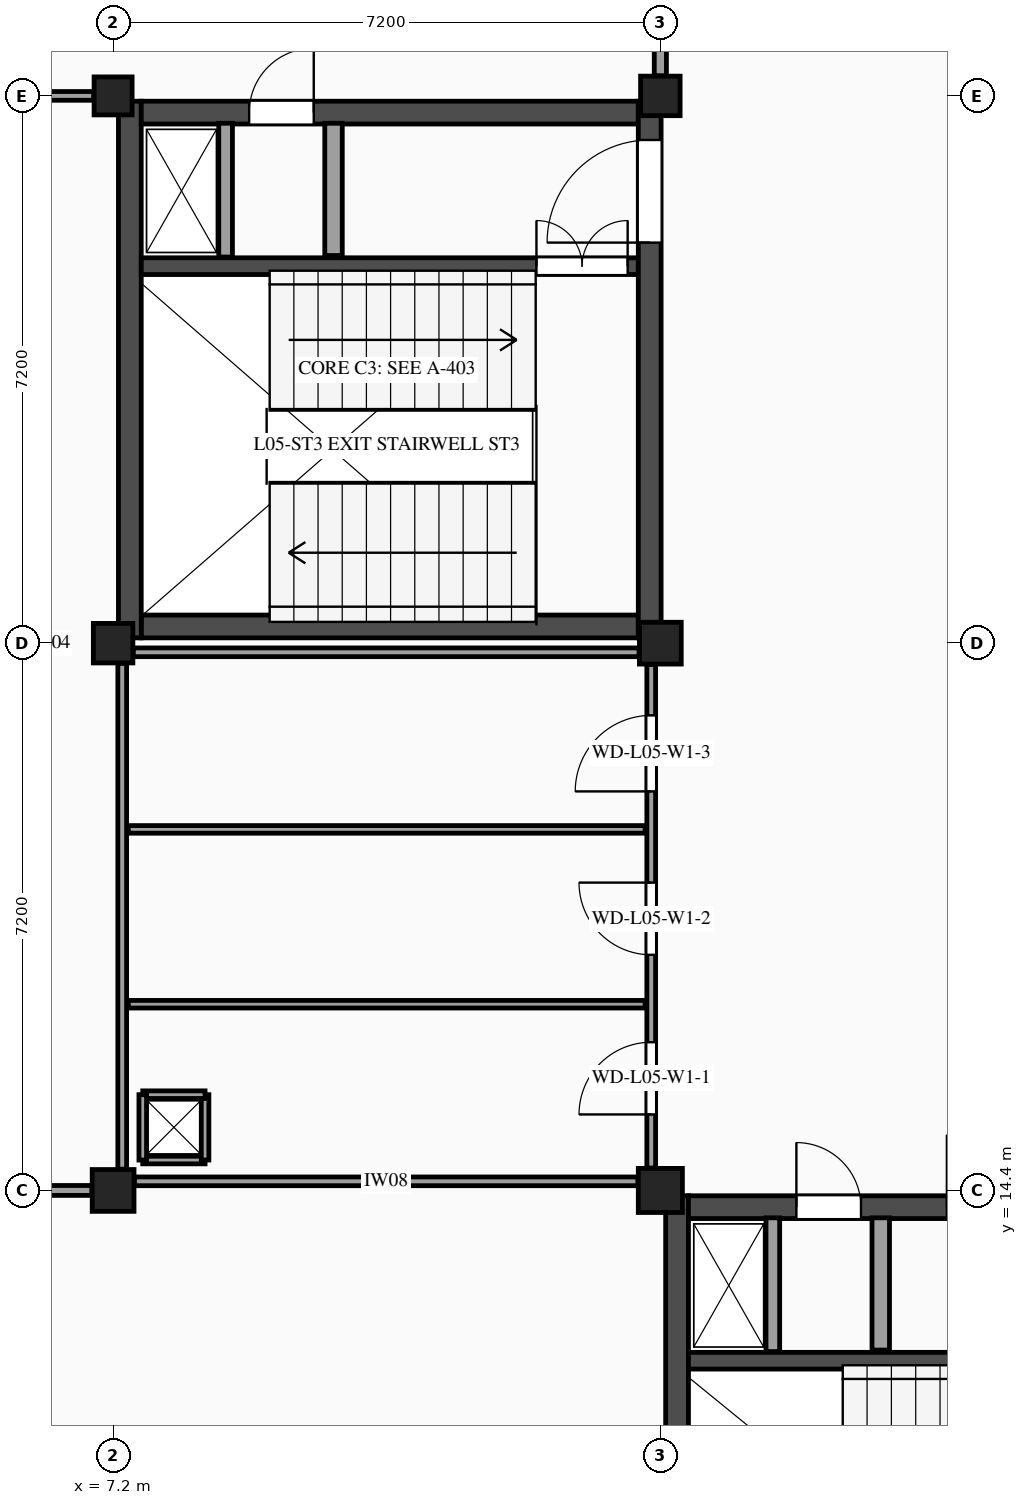
"""IFC4 building model, lengths in metres.
Left out: names, types, materials, properties, quantities, classifications, styles, units other than length and angle.
Written with IfcOpenShell. Run it as: python <this file> out.ifc"""

import sys

from ifc_helpers import new_model, si_unit, direction, frame, frame_2d, origin, origin_2d, place, context, subcontext, project, spatial, rectangle, extrude, element, fill, save


model = new_model("IFC4")
c1 = context("Model", 3, precision=1e-05, world=origin(), true_north=direction((0.0, 1.0)))
c2 = subcontext(c1, "Body", "Model", "MODEL_VIEW")
j1 = project(units=[si_unit("LENGTHUNIT", "METRE"), si_unit("PLANEANGLEUNIT", "RADIAN")], contexts=[c1])
p1 = place(None, origin())
s1 = spatial("IfcSite", under=j1, at=p1, CompositionType="ELEMENT")
p2 = place(p1, origin())
s2 = spatial("IfcBuilding", under=s1, at=p2, CompositionType="ELEMENT")
p3 = place(p2, frame((0.0, 0.0, 22.8)))
s3 = spatial("IfcBuildingStorey", under=s2, at=p3, CompositionType="ELEMENT", Elevation=22.8)
p4 = place(p3, frame((7.2, 14.4, 0.0), z_axis=(0.0, 0.0, 1.0), x_axis=(1.0, 0.0, 0.0)))
e1 = element("IfcColumn", 1, at=p4, inside=s3, PredefinedType="COLUMN", context=c2, shape_type="SweptSolid", body=[
    extrude(rectangle(XDim=0.55, YDim=0.55, at=origin_2d()), origin(), (0.0, 0.0, 1.0), 3.9),
])
p5 = place(p3, frame((7.2, 21.6, 0.0), z_axis=(0.0, 0.0, 1.0), x_axis=(1.0, 0.0, 0.0)))
e2 = element("IfcColumn", 2, at=p5, inside=s3, PredefinedType="COLUMN", context=c2, shape_type="SweptSolid", body=[
    extrude(rectangle(XDim=0.52, YDim=0.52, at=origin_2d()), origin(), (0.0, 0.0, 1.0), 3.9),
])
p6 = place(p3, frame((7.2, 28.8, 0.0), z_axis=(0.0, 0.0, 1.0), x_axis=(1.0, 0.0, 0.0)))
e3 = element("IfcColumn", 3, at=p6, inside=s3, PredefinedType="COLUMN", context=c2, shape_type="SweptSolid", body=[
    extrude(rectangle(XDim=0.5, YDim=0.5, at=origin_2d()), origin(), (0.0, 0.0, 1.0), 3.9),
])
p7 = place(p3, frame((14.4, 14.4, 0.0), z_axis=(0.0, 0.0, 1.0), x_axis=(1.0, 0.0, 0.0)))
e4 = element("IfcColumn", 4, at=p7, inside=s3, PredefinedType="COLUMN", context=c2, shape_type="SweptSolid", body=[
    extrude(rectangle(XDim=0.58, YDim=0.58, at=origin_2d()), origin(), (0.0, 0.0, 1.0), 3.9),
])
p8 = place(p3, frame((14.4, 21.6, 0.0), z_axis=(0.0, 0.0, 1.0), x_axis=(1.0, 0.0, 0.0)))
e5 = element("IfcColumn", 5, at=p8, inside=s3, PredefinedType="COLUMN", context=c2, shape_type="SweptSolid", body=[
    extrude(rectangle(XDim=0.55, YDim=0.55, at=origin_2d()), origin(), (0.0, 0.0, 1.0), 3.9),
])
p9 = place(p3, frame((14.4, 28.8, 0.0), z_axis=(0.0, 0.0, 1.0), x_axis=(1.0, 0.0, 0.0)))
e6 = element("IfcColumn", 6, at=p9, inside=s3, PredefinedType="COLUMN", context=c2, shape_type="SweptSolid", body=[
    extrude(rectangle(XDim=0.52, YDim=0.52, at=origin_2d()), origin(), (0.0, 0.0, 1.0), 3.9),
])
p10 = place(p3, frame((14.62, 14.33, 0.0), z_axis=(0.0, 0.0, 1.0), x_axis=(0.0, -1.0, 0.0)))
e7 = element("IfcWall", 7, at=p10, inside=s3, PredefinedType="SHEAR", context=c2, shape_type="SweptSolid", body=[
    extrude(rectangle(XDim=7.06, YDim=0.3, at=frame_2d((3.53, 0.0))), origin(), (0.0, 0.0, 1.0), 3.67),
])
p11 = place(p3, frame((14.77, 14.18, 0.0), z_axis=(0.0, 0.0, 1.0), x_axis=(1.0, 0.0, 0.0)))
e8 = element("IfcWall", 8, at=p11, inside=s3, PredefinedType="SHEAR", context=c2, shape_type="SweptSolid", body=[
    extrude(rectangle(XDim=6.68, YDim=0.3, at=frame_2d((3.34, 0.0))), origin(), (0.0, 0.0, 1.0), 3.67),
])
p12 = place(p11, frame((1.42, 0.0, 0.0)))
e9 = element("IfcOpeningElement", 9, at=p12, cuts=e8, PredefinedType="OPENING", context=c2, shape_type="SweptSolid", body=[
    extrude(rectangle(XDim=0.85, YDim=2.1, at=frame_2d((0.425, 1.05))), frame((0.0, 0.16, 0.0), z_axis=(0.0, -1.0, 0.0), x_axis=(1.0, 0.0, 0.0)), (0.0, 0.0, 1.0), 0.32),
])
p13 = place(p11, frame((3.4, 0.0, 0.0)))
e10 = element("IfcOpeningElement", 10, at=p13, cuts=e8, PredefinedType="OPENING", context=c2, shape_type="SweptSolid", body=[
    extrude(rectangle(XDim=0.95, YDim=2.15, at=frame_2d((0.475, 1.075))), frame((0.0, 0.16, 0.0), z_axis=(0.0, -1.0, 0.0), x_axis=(1.0, 0.0, 0.0)), (0.0, 0.0, 1.0), 0.32),
])
p14 = place(p3, frame((14.77, 12.16, 0.0), z_axis=(0.0, 0.0, 1.0), x_axis=(1.0, 0.0, 0.0)))
e11 = element("IfcWall", 11, at=p14, inside=s3, PredefinedType="SHEAR", context=c2, shape_type="SweptSolid", body=[
    extrude(rectangle(XDim=6.68, YDim=0.22, at=frame_2d((3.34, 0.0))), origin(), (0.0, 0.0, 1.0), 3.67),
])
p15 = place(p3, frame((17.3, 12.3, 0.0), z_axis=(0.0, 0.0, 1.0), x_axis=(0.0, 1.0, 0.0)))
e12 = element("IfcWall", 12, at=p15, inside=s3, PredefinedType="PARTITIONING", context=c2, shape_type="SweptSolid", body=[
    extrude(rectangle(XDim=1.74, YDim=0.23, at=frame_2d((0.87, 0.0))), origin(), (0.0, 0.0, 1.0), 3.67),
])
p16 = place(p3, frame((15.88, 12.28, 0.0), z_axis=(0.0, 0.0, 1.0), x_axis=(0.0, 1.0, 0.0)))
e13 = element("IfcWall", 13, at=p16, inside=s3, PredefinedType="PARTITIONING", context=c2, shape_type="SweptSolid", body=[
    extrude(rectangle(XDim=1.76, YDim=0.18, at=frame_2d((0.88, 0.0))), origin(), (0.0, 0.0, 1.0), 3.67),
])
p17 = place(p3, frame((7.57, 21.82, 0.0), z_axis=(0.0, 0.0, 1.0), x_axis=(1.0, 0.0, 0.0)))
e14 = element("IfcWall", 14, at=p17, inside=s3, PredefinedType="SHEAR", context=c2, shape_type="SweptSolid", body=[
    extrude(rectangle(XDim=6.54, YDim=0.3, at=frame_2d((3.27, 0.0))), origin(), (0.0, 0.0, 1.0), 3.67),
])
p18 = place(p3, frame((7.42, 28.73, 0.0), z_axis=(0.0, 0.0, 1.0), x_axis=(0.0, -1.0, 0.0)))
e15 = element("IfcWall", 15, at=p18, inside=s3, PredefinedType="SHEAR", context=c2, shape_type="SweptSolid", body=[
    extrude(rectangle(XDim=7.06, YDim=0.3, at=frame_2d((3.53, 0.0))), origin(), (0.0, 0.0, 1.0), 3.67),
])
p19 = place(p3, frame((7.57, 28.58, 0.0), z_axis=(0.0, 0.0, 1.0), x_axis=(1.0, 0.0, 0.0)))
e16 = element("IfcWall", 16, at=p19, inside=s3, PredefinedType="SHEAR", context=c2, shape_type="SweptSolid", body=[
    extrude(rectangle(XDim=6.54, YDim=0.3, at=frame_2d((3.27, 0.0))), origin(), (0.0, 0.0, 1.0), 3.67),
])
p20 = place(p19, frame((1.42, 0.0, 0.0)))
e17 = element("IfcOpeningElement", 17, at=p20, cuts=e16, PredefinedType="OPENING", context=c2, shape_type="SweptSolid", body=[
    extrude(rectangle(XDim=0.85, YDim=2.1, at=frame_2d((0.425, 1.05))), frame((0.0, 0.16, 0.0), z_axis=(0.0, -1.0, 0.0), x_axis=(1.0, 0.0, 0.0)), (0.0, 0.0, 1.0), 0.32),
])
p21 = place(p3, frame((7.57, 26.56, 0.0), z_axis=(0.0, 0.0, 1.0), x_axis=(1.0, 0.0, 0.0)))
e18 = element("IfcWall", 18, at=p21, inside=s3, PredefinedType="SHEAR", context=c2, shape_type="SweptSolid", body=[
    extrude(rectangle(XDim=6.54, YDim=0.22, at=frame_2d((3.27, 0.0))), origin(), (0.0, 0.0, 1.0), 3.67),
])
p22 = place(p21, frame((5.2, 0.0, 0.0)))
e19 = element("IfcOpeningElement", 19, at=p22, cuts=e18, PredefinedType="OPENING", context=c2, shape_type="SweptSolid", body=[
    extrude(rectangle(XDim=1.2, YDim=2.2, at=frame_2d((0.6, 1.1))), frame((0.0, 0.12, 0.0), z_axis=(0.0, -1.0, 0.0), x_axis=(1.0, 0.0, 0.0)), (0.0, 0.0, 1.0), 0.24),
])
p23 = place(p3, frame((10.1, 26.7, 0.0), z_axis=(0.0, 0.0, 1.0), x_axis=(0.0, 1.0, 0.0)))
e20 = element("IfcWall", 20, at=p23, inside=s3, PredefinedType="PARTITIONING", context=c2, shape_type="SweptSolid", body=[
    extrude(rectangle(XDim=1.74, YDim=0.23, at=frame_2d((0.87, 0.0))), origin(), (0.0, 0.0, 1.0), 3.67),
])
p24 = place(p3, frame((8.68, 26.68, 0.0), z_axis=(0.0, 0.0, 1.0), x_axis=(0.0, 1.0, 0.0)))
e21 = element("IfcWall", 21, at=p24, inside=s3, PredefinedType="PARTITIONING", context=c2, shape_type="SweptSolid", body=[
    extrude(rectangle(XDim=1.76, YDim=0.18, at=frame_2d((0.88, 0.0))), origin(), (0.0, 0.0, 1.0), 3.67),
])
p25 = place(p3, frame((14.26, 21.67, 0.0), z_axis=(0.0, 0.0, 1.0), x_axis=(0.0, 1.0, 0.0)))
e22 = element("IfcWall", 22, at=p25, inside=s3, PredefinedType="SHEAR", context=c2, shape_type="SweptSolid", body=[
    extrude(rectangle(XDim=7.06, YDim=0.3, at=frame_2d((3.53, 0.0))), origin(), (0.0, 0.0, 1.0), 3.67),
])
p26 = place(p25, frame((5.2, 0.0, 0.0)))
e23 = element("IfcOpeningElement", 23, at=p26, cuts=e22, PredefinedType="OPENING", context=c2, shape_type="SweptSolid", body=[
    extrude(rectangle(XDim=1.35, YDim=2.15, at=frame_2d((0.675, 1.075))), frame((0.0, 0.16, 0.0), z_axis=(0.0, -1.0, 0.0), x_axis=(1.0, 0.0, 0.0)), (0.0, 0.0, 1.0), 0.32),
])
p27 = place(p3, frame((7.48, 14.52, 0.0), z_axis=(0.0, 0.0, 1.0), x_axis=(1.0, 0.0, 0.0)))
e24 = element("IfcWall", 24, at=p27, inside=s3, PredefinedType="PARTITIONING", context=c2, shape_type="SweptSolid", body=[
    extrude(rectangle(XDim=6.625, YDim=0.115, at=frame_2d((3.312, 0.0))), origin(), (0.0, 0.0, 1.0), 3.01),
])
p28 = place(p3, frame((7.465, 21.48, 0.0), z_axis=(0.0, 0.0, 1.0), x_axis=(1.0, 0.0, 0.0)))
e25 = element("IfcWall", 25, at=p28, inside=s3, PredefinedType="PARTITIONING", context=c2, shape_type="SweptSolid", body=[
    extrude(rectangle(XDim=6.655, YDim=0.115, at=frame_2d((3.328, 0.0))), origin(), (0.0, 0.0, 1.0), 3.01),
])
p29 = place(p3, frame((7.32, 14.68, 0.0), z_axis=(0.0, 0.0, 1.0), x_axis=(0.0, 1.0, 0.0)))
e26 = element("IfcWall", 26, at=p29, inside=s3, PredefinedType="PARTITIONING", context=c2, shape_type="SweptSolid", body=[
    extrude(rectangle(XDim=6.655, YDim=0.115, at=frame_2d((3.328, 0.0))), origin(), (0.0, 0.0, 1.0), 3.035),
])
p30 = place(p3, frame((14.28, 14.695, 0.0), z_axis=(0.0, 0.0, 1.0), x_axis=(0.0, 1.0, 0.0)))
e27 = element("IfcWall", 27, at=p30, inside=s3, PredefinedType="PARTITIONING", context=c2, shape_type="SweptSolid", body=[
    extrude(rectangle(XDim=6.625, YDim=0.115, at=frame_2d((3.312, 0.0))), origin(), (0.0, 0.0, 1.0), 3.035),
])
p31 = place(p30, frame((0.705, 0.0, 0.0)))
e28 = element("IfcOpeningElement", 28, at=p31, cuts=e27, PredefinedType="OPENING", context=c2, shape_type="SweptSolid", body=[
    extrude(rectangle(XDim=0.95, YDim=2.1, at=frame_2d((0.475, 1.05))), frame((0.0, 0.067, 0.0), z_axis=(0.0, -1.0, 0.0), x_axis=(1.0, 0.0, 0.0)), (0.0, 0.0, 1.0), 0.135),
])
p32 = place(p30, frame((2.805, 0.0, 0.0)))
e29 = element("IfcOpeningElement", 29, at=p32, cuts=e27, PredefinedType="OPENING", context=c2, shape_type="SweptSolid", body=[
    extrude(rectangle(XDim=0.95, YDim=2.1, at=frame_2d((0.475, 1.05))), frame((0.0, 0.067, 0.0), z_axis=(0.0, -1.0, 0.0), x_axis=(1.0, 0.0, 0.0)), (0.0, 0.0, 1.0), 0.135),
])
p33 = place(p30, frame((4.955, 0.0, 0.0)))
e30 = element("IfcOpeningElement", 30, at=p33, cuts=e27, PredefinedType="OPENING", context=c2, shape_type="SweptSolid", body=[
    extrude(rectangle(XDim=1.0, YDim=2.15, at=frame_2d((0.5, 1.075))), frame((0.0, 0.067, 0.0), z_axis=(0.0, -1.0, 0.0), x_axis=(1.0, 0.0, 0.0)), (0.0, 0.0, 1.0), 0.135),
])
for number, where, z_axis, x_axis in (
    (31, (7.4, 16.85, 0.0), (0.0, 0.0, 1.0), (1.0, 0.0, 0.0)),
    (32, (7.4, 19.15, 0.0), (0.0, 0.0, 1.0), (1.0, 0.0, 0.0)),
):
    element("IfcWall", number, at=place(p3, frame(where, z_axis=z_axis, x_axis=x_axis)), inside=s3, PredefinedType="PARTITIONING", context=c2, shape_type="SweptSolid", body=[
        extrude(rectangle(XDim=6.8, YDim=0.1, at=frame_2d((3.4, 0.0))), origin(), (0.0, 0.0, 1.0), 3.67),
    ])
p34 = place(p3, frame((7.59, 14.8, 0.0), z_axis=(0.0, 0.0, 1.0), x_axis=(1.0, 0.0, 0.0)))
e33 = element("IfcWall", 33, at=p34, inside=s3, PredefinedType="PARTITIONING", context=c2, shape_type="SweptSolid", body=[
    extrude(rectangle(XDim=0.82, YDim=0.1, at=frame_2d((0.41, 0.0))), origin(), (0.0, 0.0, 1.0), 3.67),
])
p35 = place(p3, frame((8.41, 14.8, 0.0), z_axis=(0.0, 0.0, 1.0), x_axis=(0.0, 1.0, 0.0)))
e34 = element("IfcWall", 34, at=p35, inside=s3, PredefinedType="PARTITIONING", context=c2, shape_type="SweptSolid", body=[
    extrude(rectangle(XDim=0.86, YDim=0.1, at=frame_2d((0.43, 0.0))), origin(), (0.0, 0.0, 1.0), 3.67),
])
p36 = place(p3, frame((8.41, 15.66, 0.0), z_axis=(0.0, 0.0, 1.0), x_axis=(-1.0, 0.0, 0.0)))
e35 = element("IfcWall", 35, at=p36, inside=s3, PredefinedType="PARTITIONING", context=c2, shape_type="SweptSolid", body=[
    extrude(rectangle(XDim=0.82, YDim=0.1, at=frame_2d((0.41, 0.0))), origin(), (0.0, 0.0, 1.0), 3.67),
])
p37 = place(p3, frame((7.59, 15.66, 0.0), z_axis=(0.0, 0.0, 1.0), x_axis=(0.0, -1.0, 0.0)))
e36 = element("IfcWall", 36, at=p37, inside=s3, PredefinedType="PARTITIONING", context=c2, shape_type="SweptSolid", body=[
    extrude(rectangle(XDim=0.86, YDim=0.1, at=frame_2d((0.43, 0.0))), origin(), (0.0, 0.0, 1.0), 3.67),
])
p38 = place(p3, frame((0.265, 14.4, 0.0), z_axis=(0.0, 0.0, 1.0), x_axis=(1.0, 0.0, 0.0)))
e37 = element("IfcWall", 37, at=p38, inside=s3, PredefinedType="PARTITIONING", context=c2, shape_type="SweptSolid", body=[
    extrude(rectangle(XDim=6.655, YDim=0.13, at=frame_2d((3.328, 0.0))), origin(), (0.0, 0.0, 1.0), 2.97),
])
p39 = place(p38, frame((2.853, 0.0, 0.0)))
e38 = element("IfcOpeningElement", 38, at=p39, cuts=e37, PredefinedType="OPENING", context=c2, shape_type="SweptSolid", body=[
    extrude(rectangle(XDim=0.95, YDim=2.15, at=frame_2d((0.475, 1.075))), frame((0.0, 0.075, 0.0), z_axis=(0.0, -1.0, 0.0), x_axis=(1.0, 0.0, 0.0)), (0.0, 0.0, 1.0), 0.15),
])
p40 = place(p3, frame((0.295, 28.8, 0.0), z_axis=(0.0, 0.0, 1.0), x_axis=(1.0, 0.0, 0.0)))
e39 = element("IfcWall", 39, at=p40, inside=s3, PredefinedType="PARTITIONING", context=c2, shape_type="SweptSolid", body=[
    extrude(rectangle(XDim=6.65, YDim=0.115, at=frame_2d((3.325, 0.0))), origin(), (0.0, 0.0, 1.0), 2.97),
])
p41 = place(p40, frame((2.365, 0.0, 0.0)))
e40 = element("IfcOpeningElement", 40, at=p41, cuts=e39, PredefinedType="OPENING", context=c2, shape_type="SweptSolid", body=[
    extrude(rectangle(XDim=1.92, YDim=2.35, at=frame_2d((0.96, 1.175))), frame((0.0, 0.067, 0.0), z_axis=(0.0, -1.0, 0.0), x_axis=(1.0, 0.0, 0.0)), (0.0, 0.0, 1.0), 0.135),
])
p42 = place(p3, frame((14.4, 29.065, 0.0), z_axis=(0.0, 0.0, 1.0), x_axis=(0.0, 1.0, 0.0)))
e41 = element("IfcWall", 41, at=p42, inside=s3, PredefinedType="PARTITIONING", context=c2, shape_type="SweptSolid", body=[
    extrude(rectangle(XDim=6.68, YDim=0.16, at=frame_2d((3.34, 0.0))), origin(), (0.0, 0.0, 1.0), 2.985),
])
p43 = place(p12, origin())
e42 = element("IfcDoor", 42, at=p43, inside=s3, OperationType="SINGLE_SWING_LEFT", PredefinedType="DOOR", context=c2, shape_type="SweptSolid", body=[
    extrude(rectangle(XDim=0.85, YDim=2.1, at=frame_2d((0.425, 1.05))), frame((0.0, 0.025, 0.0), z_axis=(0.0, -1.0, 0.0), x_axis=(1.0, 0.0, 0.0)), (0.0, 0.0, 1.0), 0.05),
])
fill(e9, e42)
p44 = place(p13, origin())
e43 = element("IfcDoor", 43, at=p44, inside=s3, OperationType="SINGLE_SWING_LEFT", PredefinedType="DOOR", context=c2, shape_type="SweptSolid", body=[
    extrude(rectangle(XDim=0.95, YDim=2.15, at=frame_2d((0.475, 1.075))), frame((0.0, 0.025, 0.0), z_axis=(0.0, -1.0, 0.0), x_axis=(1.0, 0.0, 0.0)), (0.0, 0.0, 1.0), 0.05),
])
fill(e10, e43)
p45 = place(p20, origin())
e44 = element("IfcDoor", 44, at=p45, inside=s3, OperationType="SINGLE_SWING_RIGHT", PredefinedType="DOOR", context=c2, shape_type="SweptSolid", body=[
    extrude(rectangle(XDim=0.85, YDim=2.1, at=frame_2d((0.425, 1.05))), frame((0.0, 0.025, 0.0), z_axis=(0.0, -1.0, 0.0), x_axis=(1.0, 0.0, 0.0)), (0.0, 0.0, 1.0), 0.05),
])
fill(e17, e44)
p46 = place(p22, origin())
e45 = element("IfcDoor", 45, at=p46, inside=s3, OperationType="DOUBLE_DOOR_SINGLE_SWING", PredefinedType="DOOR", context=c2, shape_type="SweptSolid", body=[
    extrude(rectangle(XDim=1.2, YDim=2.2, at=frame_2d((0.6, 1.1))), frame((0.0, 0.025, 0.0), z_axis=(0.0, -1.0, 0.0), x_axis=(1.0, 0.0, 0.0)), (0.0, 0.0, 1.0), 0.05),
])
fill(e19, e45)
p47 = place(p26, origin())
e46 = element("IfcDoor", 46, at=p47, inside=s3, OperationType="SINGLE_SWING_LEFT", PredefinedType="DOOR", context=c2, shape_type="SweptSolid", body=[
    extrude(rectangle(XDim=1.35, YDim=2.15, at=frame_2d((0.675, 1.075))), frame((0.0, 0.025, 0.0), z_axis=(0.0, -1.0, 0.0), x_axis=(1.0, 0.0, 0.0)), (0.0, 0.0, 1.0), 0.05),
])
fill(e23, e46)
p48 = place(p31, origin())
e47 = element("IfcDoor", 47, at=p48, inside=s3, OperationType="SINGLE_SWING_LEFT", PredefinedType="DOOR", context=c2, shape_type="SweptSolid", body=[
    extrude(rectangle(XDim=0.95, YDim=2.1, at=frame_2d((0.475, 1.05))), frame((0.0, 0.025, 0.0), z_axis=(0.0, -1.0, 0.0), x_axis=(1.0, 0.0, 0.0)), (0.0, 0.0, 1.0), 0.05),
])
fill(e28, e47)
p49 = place(p32, origin())
e48 = element("IfcDoor", 48, at=p49, inside=s3, OperationType="SINGLE_SWING_RIGHT", PredefinedType="DOOR", context=c2, shape_type="SweptSolid", body=[
    extrude(rectangle(XDim=0.95, YDim=2.1, at=frame_2d((0.475, 1.05))), frame((0.0, 0.025, 0.0), z_axis=(0.0, -1.0, 0.0), x_axis=(1.0, 0.0, 0.0)), (0.0, 0.0, 1.0), 0.05),
])
fill(e29, e48)
p50 = place(p33, origin())
e49 = element("IfcDoor", 49, at=p50, inside=s3, OperationType="SINGLE_SWING_LEFT", PredefinedType="DOOR", context=c2, shape_type="SweptSolid", body=[
    extrude(rectangle(XDim=1.0, YDim=2.15, at=frame_2d((0.5, 1.075))), frame((0.0, 0.025, 0.0), z_axis=(0.0, -1.0, 0.0), x_axis=(1.0, 0.0, 0.0)), (0.0, 0.0, 1.0), 0.05),
])
fill(e30, e49)
save(model, sys.argv[1])
